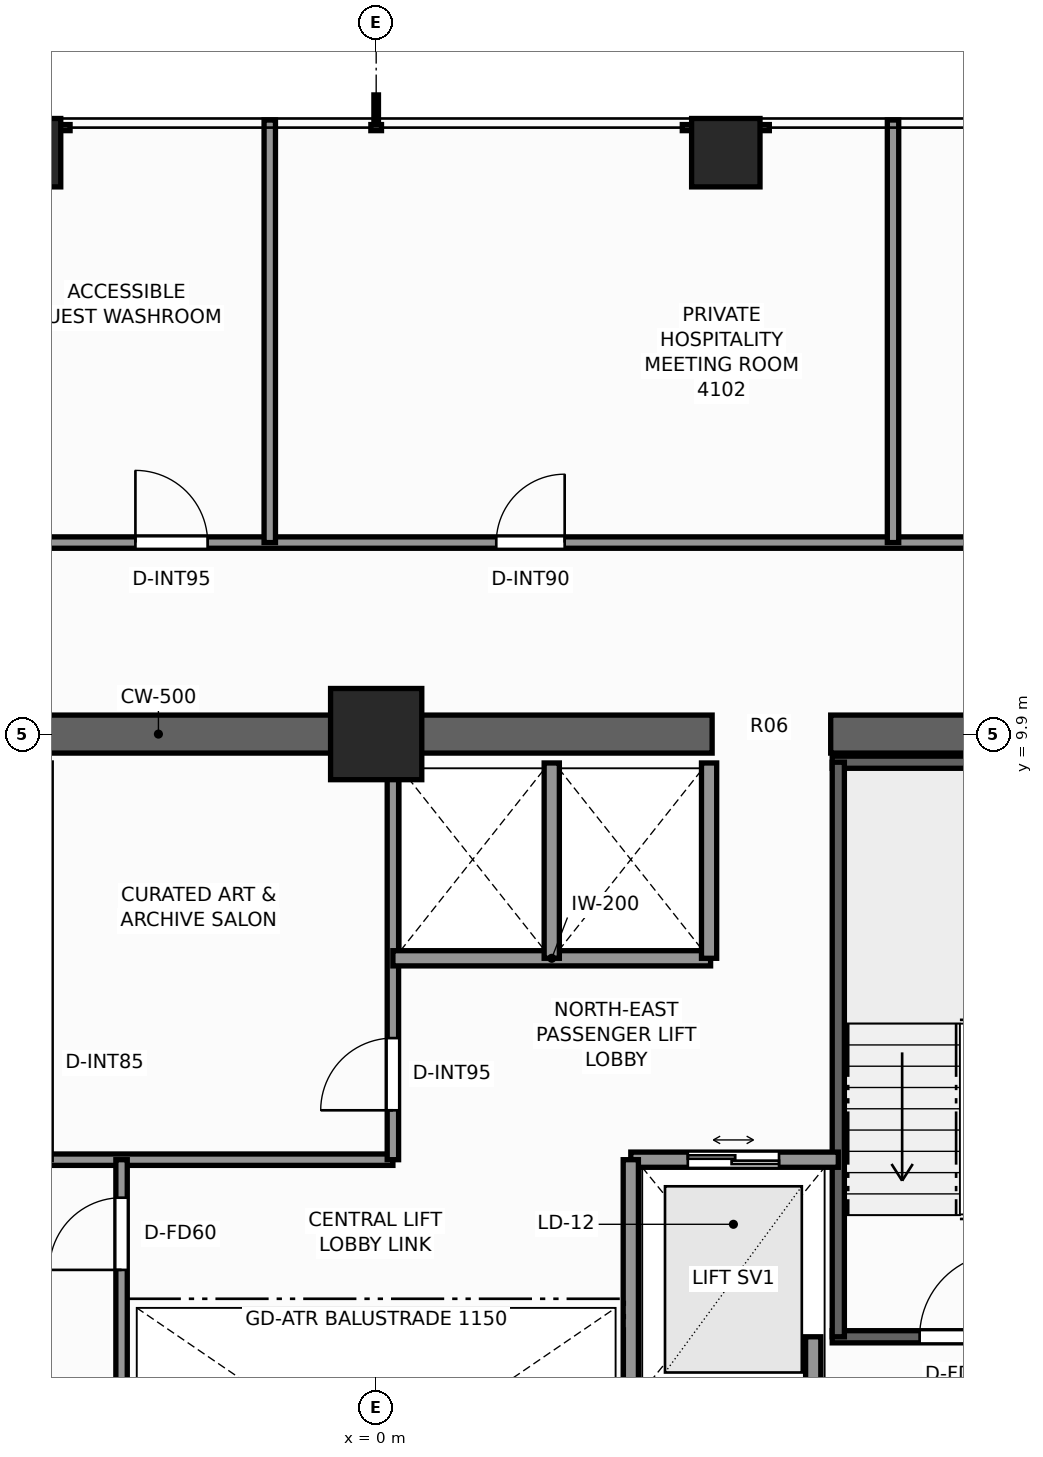
"""IFC4 building model, lengths in metres.
Left out: names, types, materials, properties, quantities, classifications, styles, units other than length and angle.
Written with IfcOpenShell. Run it as: python <this file> out.ifc"""

import sys

from ifc_helpers import new_model, si_unit, direction, frame, frame_2d, origin, origin_2d, place, context, subcontext, project, spatial, rectangle, extrude, element, fill, save


model = new_model("IFC4")
c1 = context("Model", 3, precision=1e-05, world=origin(), true_north=direction((0.0, 1.0)))
c2 = subcontext(c1, "Body", "Model", "MODEL_VIEW")
j1 = project(units=[si_unit("LENGTHUNIT", "METRE"), si_unit("PLANEANGLEUNIT", "RADIAN")], contexts=[c1])
p1 = place(None, origin())
s1 = spatial("IfcSite", under=j1, at=p1, CompositionType="ELEMENT")
p2 = place(p1, origin())
s2 = spatial("IfcBuilding", under=s1, at=p2, CompositionType="ELEMENT")
p3 = place(p2, frame((0.0, 0.0, 141.5)))
s3 = spatial("IfcBuildingStorey", under=s2, at=p3, CompositionType="ELEMENT", Elevation=141.5)
p4 = place(p3, frame((-10.15, 9.9, 0.0), z_axis=(0.0, 0.0, 1.0), x_axis=(1.0, 0.0, 0.0)))
e1 = element("IfcWall", 1, at=p4, inside=s3, PredefinedType="SHEAR", context=c2, shape_type="SweptSolid", body=[
    extrude(rectangle(XDim=14.57, YDim=0.5, at=frame_2d((7.285, 0.0))), origin(), (0.0, 0.0, 1.0), 3.3),
])
p5 = place(p3, frame((5.98, 9.9, 0.0), z_axis=(0.0, 0.0, 1.0), x_axis=(1.0, 0.0, 0.0)))
e2 = element("IfcWall", 2, at=p5, inside=s3, PredefinedType="SHEAR", context=c2, shape_type="SweptSolid", body=[
    extrude(rectangle(XDim=4.17, YDim=0.5, at=frame_2d((2.085, 0.0))), origin(), (0.0, 0.0, 1.0), 3.3),
])
p6 = place(p3, frame((0.0, 9.9, 0.0), z_axis=(0.0, 0.0, 1.0), x_axis=(1.0, 0.0, 0.0)))
e3 = element("IfcColumn", 3, at=p6, inside=s3, PredefinedType="COLUMN", context=c2, shape_type="SweptSolid", body=[
    extrude(rectangle(XDim=1.2, YDim=1.2, at=origin_2d()), origin(), (0.0, 0.0, 1.0), 3.3),
])
for number, where, z_axis, x_axis in (
    (4, (-4.6, 17.55, 0.0), (0.0, 0.0, 1.0), (1.0, 0.0, 0.0)),
    (5, (4.6, 17.55, 0.0), (0.0, 0.0, 1.0), (1.0, 0.0, 0.0)),
):
    element("IfcColumn", number, at=place(p3, frame(where, z_axis=z_axis, x_axis=x_axis)), inside=s3, PredefinedType="COLUMN", context=c2, shape_type="SweptSolid", body=[
        extrude(rectangle(XDim=0.9, YDim=0.9, at=origin_2d()), origin(), (0.0, 0.0, 1.0), 3.3),
    ])
p7 = place(p3, frame((6.0, 1.97, 0.0), z_axis=(0.0, 0.0, 1.0), x_axis=(1.0, 0.0, 0.0)))
e6 = element("IfcWall", 6, at=p7, inside=s3, PredefinedType="SHEAR", context=c2, shape_type="SweptSolid", body=[
    extrude(rectangle(XDim=3.52, YDim=0.16, at=frame_2d((1.76, 0.0))), origin(), (0.0, 0.0, 1.0), 3.3),
])
p8 = place(p7, frame((1.15, 0.0, 0.0)))
e7 = element("IfcOpeningElement", 7, at=p8, cuts=e6, PredefinedType="OPENING", context=c2, shape_type="SweptSolid", body=[
    extrude(rectangle(XDim=1.1, YDim=2.2, at=frame_2d((0.55, 1.1))), frame((0.0, 0.09, 0.0), z_axis=(0.0, -1.0, 0.0), x_axis=(1.0, 0.0, 0.0)), (0.0, 0.0, 1.0), 0.18),
])
p9 = place(p3, frame((6.0, 9.53, 0.0), z_axis=(0.0, 0.0, 1.0), x_axis=(1.0, 0.0, 0.0)))
e8 = element("IfcWall", 8, at=p9, inside=s3, PredefinedType="SHEAR", context=c2, shape_type="SweptSolid", body=[
    extrude(rectangle(XDim=3.52, YDim=0.16, at=frame_2d((1.76, 0.0))), origin(), (0.0, 0.0, 1.0), 3.3),
])
p10 = place(p3, frame((6.08, 1.97, 0.0), z_axis=(0.0, 0.0, 1.0), x_axis=(0.0, 1.0, 0.0)))
e9 = element("IfcWall", 9, at=p10, inside=s3, PredefinedType="SHEAR", context=c2, shape_type="SweptSolid", body=[
    extrude(rectangle(XDim=7.56, YDim=0.16, at=frame_2d((3.78, 0.0))), origin(), (0.0, 0.0, 1.0), 3.3),
])
p11 = place(p3, frame((5.75, -3.6, 0.0), z_axis=(0.0, 0.0, 1.0), x_axis=(0.0, 1.0, 0.0)))
e10 = element("IfcWall", 10, at=p11, inside=s3, PredefinedType="SOLIDWALL", context=c2, shape_type="SweptSolid", body=[
    extrude(rectangle(XDim=5.57, YDim=0.2, at=frame_2d((2.785, 0.0))), origin(), (0.0, 0.0, 1.0), 2.735),
])
p12 = place(p11, frame((2.75, 0.0, 0.0)))
e11 = element("IfcOpeningElement", 11, at=p12, cuts=e10, PredefinedType="OPENING", context=c2, shape_type="SweptSolid", body=[
    extrude(rectangle(XDim=1.1, YDim=2.2, at=frame_2d((0.55, 1.1))), frame((0.0, 0.11, 0.0), z_axis=(0.0, -1.0, 0.0), x_axis=(1.0, 0.0, 0.0)), (0.0, 0.0, 1.0), 0.22),
])
p13 = place(p3, frame((3.35, 4.3, 0.0), z_axis=(0.0, 0.0, 1.0), x_axis=(1.0, 0.0, 0.0)))
e12 = element("IfcWall", 12, at=p13, inside=s3, PredefinedType="SOLIDWALL", context=c2, shape_type="SweptSolid", body=[
    extrude(rectangle(XDim=2.73, YDim=0.2, at=frame_2d((1.365, 0.0))), origin(), (0.0, 0.0, 1.0), 3.1),
])
p14 = place(p13, frame((0.75, 0.0, 0.0)))
e13 = element("IfcOpeningElement", 13, at=p14, cuts=e12, PredefinedType="OPENING", context=c2, shape_type="SweptSolid", body=[
    extrude(rectangle(XDim=1.2, YDim=2.25, at=frame_2d((0.6, 1.125))), frame((0.0, 0.11, 0.0), z_axis=(0.0, -1.0, 0.0), x_axis=(1.0, 0.0, 0.0)), (0.0, 0.0, 1.0), 0.22),
])
p15 = place(p3, frame((3.35, 1.1, 0.0), z_axis=(0.0, 0.0, 1.0), x_axis=(0.0, 1.0, 0.0)))
e14 = element("IfcWall", 14, at=p15, inside=s3, PredefinedType="SOLIDWALL", context=c2, shape_type="SweptSolid", body=[
    extrude(rectangle(XDim=3.2, YDim=0.2, at=frame_2d((1.6, 0.0))), origin(), (0.0, 0.0, 1.0), 2.735),
])
p16 = place(p3, frame((-6.08, 4.3, 0.0), z_axis=(0.0, 0.0, 1.0), x_axis=(1.0, 0.0, 0.0)))
e15 = element("IfcWall", 15, at=p16, inside=s3, PredefinedType="PARTITIONING", context=c2, shape_type="SweptSolid", body=[
    extrude(rectangle(XDim=6.3, YDim=0.15, at=frame_2d((3.15, 0.0))), origin(), (0.0, 0.0, 1.0), 3.1),
])
p17 = place(p3, frame((0.22, 4.3, 0.0), z_axis=(0.0, 0.0, 1.0), x_axis=(0.0, 1.0, 0.0)))
e16 = element("IfcWall", 16, at=p17, inside=s3, PredefinedType="PARTITIONING", context=c2, shape_type="SweptSolid", body=[
    extrude(rectangle(XDim=5.22, YDim=0.15, at=frame_2d((2.61, 0.0))), origin(), (0.0, 0.0, 1.0), 3.1),
])
p18 = place(p17, frame((0.65, 0.0, 0.0)))
e17 = element("IfcOpeningElement", 17, at=p18, cuts=e16, PredefinedType="OPENING", context=c2, shape_type="SweptSolid", body=[
    extrude(rectangle(XDim=0.95, YDim=2.06, at=frame_2d((0.475, 1.03))), frame((0.0, 0.085, 0.0), z_axis=(0.0, -1.0, 0.0), x_axis=(1.0, 0.0, 0.0)), (0.0, 0.0, 1.0), 0.17),
])
p19 = place(p3, frame((0.22, 6.95, 0.0), z_axis=(0.0, 0.0, 1.0), x_axis=(1.0, 0.0, 0.0)))
e18 = element("IfcWall", 18, at=p19, inside=s3, PredefinedType="SOLIDWALL", context=c2, shape_type="SweptSolid", body=[
    extrude(rectangle(XDim=4.18, YDim=0.2, at=frame_2d((2.09, 0.0))), origin(), (0.0, 0.0, 1.0), 3.1),
])
for number, where, z_axis, x_axis in (
    (19, (4.38, 6.95, 0.0), (0.0, 0.0, 1.0), (0.0, 1.0, 0.0)),
    (20, (2.31, 6.95, 0.0), (0.0, 0.0, 1.0), (0.0, 1.0, 0.0)),
):
    element("IfcWall", number, at=place(p3, frame(where, z_axis=z_axis, x_axis=x_axis)), inside=s3, PredefinedType="SOLIDWALL", context=c2, shape_type="SweptSolid", body=[
        extrude(rectangle(XDim=2.57, YDim=0.2, at=frame_2d((1.285, 0.0))), origin(), (0.0, 0.0, 1.0), 3.1),
    ])
p20 = place(p3, frame((-3.35, 1.1, 0.0), z_axis=(0.0, 0.0, 1.0), x_axis=(0.0, 1.0, 0.0)))
e21 = element("IfcWall", 21, at=p20, inside=s3, PredefinedType="PARTITIONING", context=c2, shape_type="SweptSolid", body=[
    extrude(rectangle(XDim=3.2, YDim=0.15, at=frame_2d((1.6, 0.0))), origin(), (0.0, 0.0, 1.0), 2.735),
])
p21 = place(p20, frame((1.75, 0.0, 0.0)))
e22 = element("IfcOpeningElement", 22, at=p21, cuts=e21, PredefinedType="OPENING", context=c2, shape_type="SweptSolid", body=[
    extrude(rectangle(XDim=0.95, YDim=2.06, at=frame_2d((0.475, 1.03))), frame((0.0, 0.085, 0.0), z_axis=(0.0, -1.0, 0.0), x_axis=(1.0, 0.0, 0.0)), (0.0, 0.0, 1.0), 0.17),
])
p22 = place(p3, frame((-12.26, 12.42, 0.0), z_axis=(0.0, 0.0, 1.0), x_axis=(1.0, 0.0, 0.0)))
e23 = element("IfcWall", 23, at=p22, inside=s3, PredefinedType="PARTITIONING", context=c2, shape_type="SweptSolid", body=[
    extrude(rectangle(XDim=24.68, YDim=0.15, at=frame_2d((12.34, 0.0))), origin(), (0.0, 0.0, 1.0), 2.312),
])
p23 = place(p22, frame((2.93, 0.0, 0.0)))
e24 = element("IfcOpeningElement", 24, at=p23, cuts=e23, PredefinedType="OPENING", context=c2, shape_type="SweptSolid", body=[
    extrude(rectangle(XDim=0.9, YDim=2.06, at=frame_2d((0.45, 1.03))), frame((0.0, 0.085, 0.0), z_axis=(0.0, -1.0, 0.0), x_axis=(1.0, 0.0, 0.0)), (0.0, 0.0, 1.0), 0.17),
])
p24 = place(p22, frame((5.09, 0.0, 0.0)))
e25 = element("IfcOpeningElement", 25, at=p24, cuts=e23, PredefinedType="OPENING", context=c2, shape_type="SweptSolid", body=[
    extrude(rectangle(XDim=0.9, YDim=2.06, at=frame_2d((0.45, 1.03))), frame((0.0, 0.085, 0.0), z_axis=(0.0, -1.0, 0.0), x_axis=(1.0, 0.0, 0.0)), (0.0, 0.0, 1.0), 0.17),
])
p25 = place(p22, frame((9.092, 0.0, 0.0)))
e26 = element("IfcOpeningElement", 26, at=p25, cuts=e23, PredefinedType="OPENING", context=c2, shape_type="SweptSolid", body=[
    extrude(rectangle(XDim=0.95, YDim=2.06, at=frame_2d((0.475, 1.03))), frame((0.0, 0.085, 0.0), z_axis=(0.0, -1.0, 0.0), x_axis=(1.0, 0.0, 0.0)), (0.0, 0.0, 1.0), 0.17),
])
p26 = place(p22, frame((13.84, 0.0, 0.0)))
e27 = element("IfcOpeningElement", 27, at=p26, cuts=e23, PredefinedType="OPENING", context=c2, shape_type="SweptSolid", body=[
    extrude(rectangle(XDim=0.9, YDim=2.06, at=frame_2d((0.45, 1.03))), frame((0.0, 0.085, 0.0), z_axis=(0.0, -1.0, 0.0), x_axis=(1.0, 0.0, 0.0)), (0.0, 0.0, 1.0), 0.17),
])
p27 = place(p22, frame((20.256, 0.0, 0.0)))
e28 = element("IfcOpeningElement", 28, at=p27, cuts=e23, PredefinedType="OPENING", context=c2, shape_type="SweptSolid", body=[
    extrude(rectangle(XDim=0.9, YDim=2.06, at=frame_2d((0.45, 1.03))), frame((0.0, 0.085, 0.0), z_axis=(0.0, -1.0, 0.0), x_axis=(1.0, 0.0, 0.0)), (0.0, 0.0, 1.0), 0.17),
])
for number, where, z_axis, x_axis in (
    (29, (-1.4, 12.42, 0.0), (0.0, 0.0, 1.0), (0.0, 1.0, 0.0)),
    (30, (6.8, 12.42, 0.0), (0.0, 0.0, 1.0), (0.0, 1.0, 0.0)),
):
    element("IfcWall", number, at=place(p3, frame(where, z_axis=z_axis, x_axis=x_axis)), inside=s3, PredefinedType="PARTITIONING", context=c2, shape_type="SweptSolid", body=[
        extrude(rectangle(XDim=5.56, YDim=0.15, at=frame_2d((2.78, 0.0))), origin(), (0.0, 0.0, 1.0), 2.469),
    ])
p28 = place(p8, origin())
e31 = element("IfcDoor", 31, at=p28, inside=s3, OperationType="SINGLE_SWING_RIGHT", PredefinedType="DOOR", context=c2, shape_type="SweptSolid", body=[
    extrude(rectangle(XDim=1.1, YDim=2.2, at=frame_2d((0.55, 1.1))), frame((0.0, 0.025, 0.0), z_axis=(0.0, -1.0, 0.0), x_axis=(1.0, 0.0, 0.0)), (0.0, 0.0, 1.0), 0.05),
])
fill(e7, e31)
p29 = place(p14, origin())
e32 = element("IfcDoor", 32, at=p29, inside=s3, OperationType="DOUBLE_DOOR_SLIDING", PredefinedType="DOOR", context=c2, shape_type="SweptSolid", body=[
    extrude(rectangle(XDim=1.2, YDim=2.25, at=frame_2d((0.6, 1.125))), frame((0.0, 0.025, 0.0), z_axis=(0.0, -1.0, 0.0), x_axis=(1.0, 0.0, 0.0)), (0.0, 0.0, 1.0), 0.05),
])
fill(e13, e32)
p30 = place(p18, origin())
e33 = element("IfcDoor", 33, at=p30, inside=s3, OperationType="SINGLE_SWING_LEFT", PredefinedType="DOOR", context=c2, shape_type="SweptSolid", body=[
    extrude(rectangle(XDim=0.95, YDim=2.06, at=frame_2d((0.475, 1.03))), frame((0.0, 0.025, 0.0), z_axis=(0.0, -1.0, 0.0), x_axis=(1.0, 0.0, 0.0)), (0.0, 0.0, 1.0), 0.05),
])
fill(e17, e33)
p31 = place(p21, origin())
e34 = element("IfcDoor", 34, at=p31, inside=s3, OperationType="SINGLE_SWING_LEFT", PredefinedType="DOOR", context=c2, shape_type="SweptSolid", body=[
    extrude(rectangle(XDim=0.95, YDim=2.06, at=frame_2d((0.475, 1.03))), frame((0.0, 0.025, 0.0), z_axis=(0.0, -1.0, 0.0), x_axis=(1.0, 0.0, 0.0)), (0.0, 0.0, 1.0), 0.05),
])
fill(e22, e34)
p32 = place(p25, origin())
e35 = element("IfcDoor", 35, at=p32, inside=s3, OperationType="SINGLE_SWING_LEFT", PredefinedType="DOOR", context=c2, shape_type="SweptSolid", body=[
    extrude(rectangle(XDim=0.95, YDim=2.06, at=frame_2d((0.475, 1.03))), frame((0.0, 0.025, 0.0), z_axis=(0.0, -1.0, 0.0), x_axis=(1.0, 0.0, 0.0)), (0.0, 0.0, 1.0), 0.05),
])
fill(e26, e35)
p33 = place(p26, origin())
e36 = element("IfcDoor", 36, at=p33, inside=s3, OperationType="SINGLE_SWING_RIGHT", PredefinedType="DOOR", context=c2, shape_type="SweptSolid", body=[
    extrude(rectangle(XDim=0.9, YDim=2.06, at=frame_2d((0.45, 1.03))), frame((0.0, 0.025, 0.0), z_axis=(0.0, -1.0, 0.0), x_axis=(1.0, 0.0, 0.0)), (0.0, 0.0, 1.0), 0.05),
])
fill(e27, e36)
save(model, sys.argv[1])
